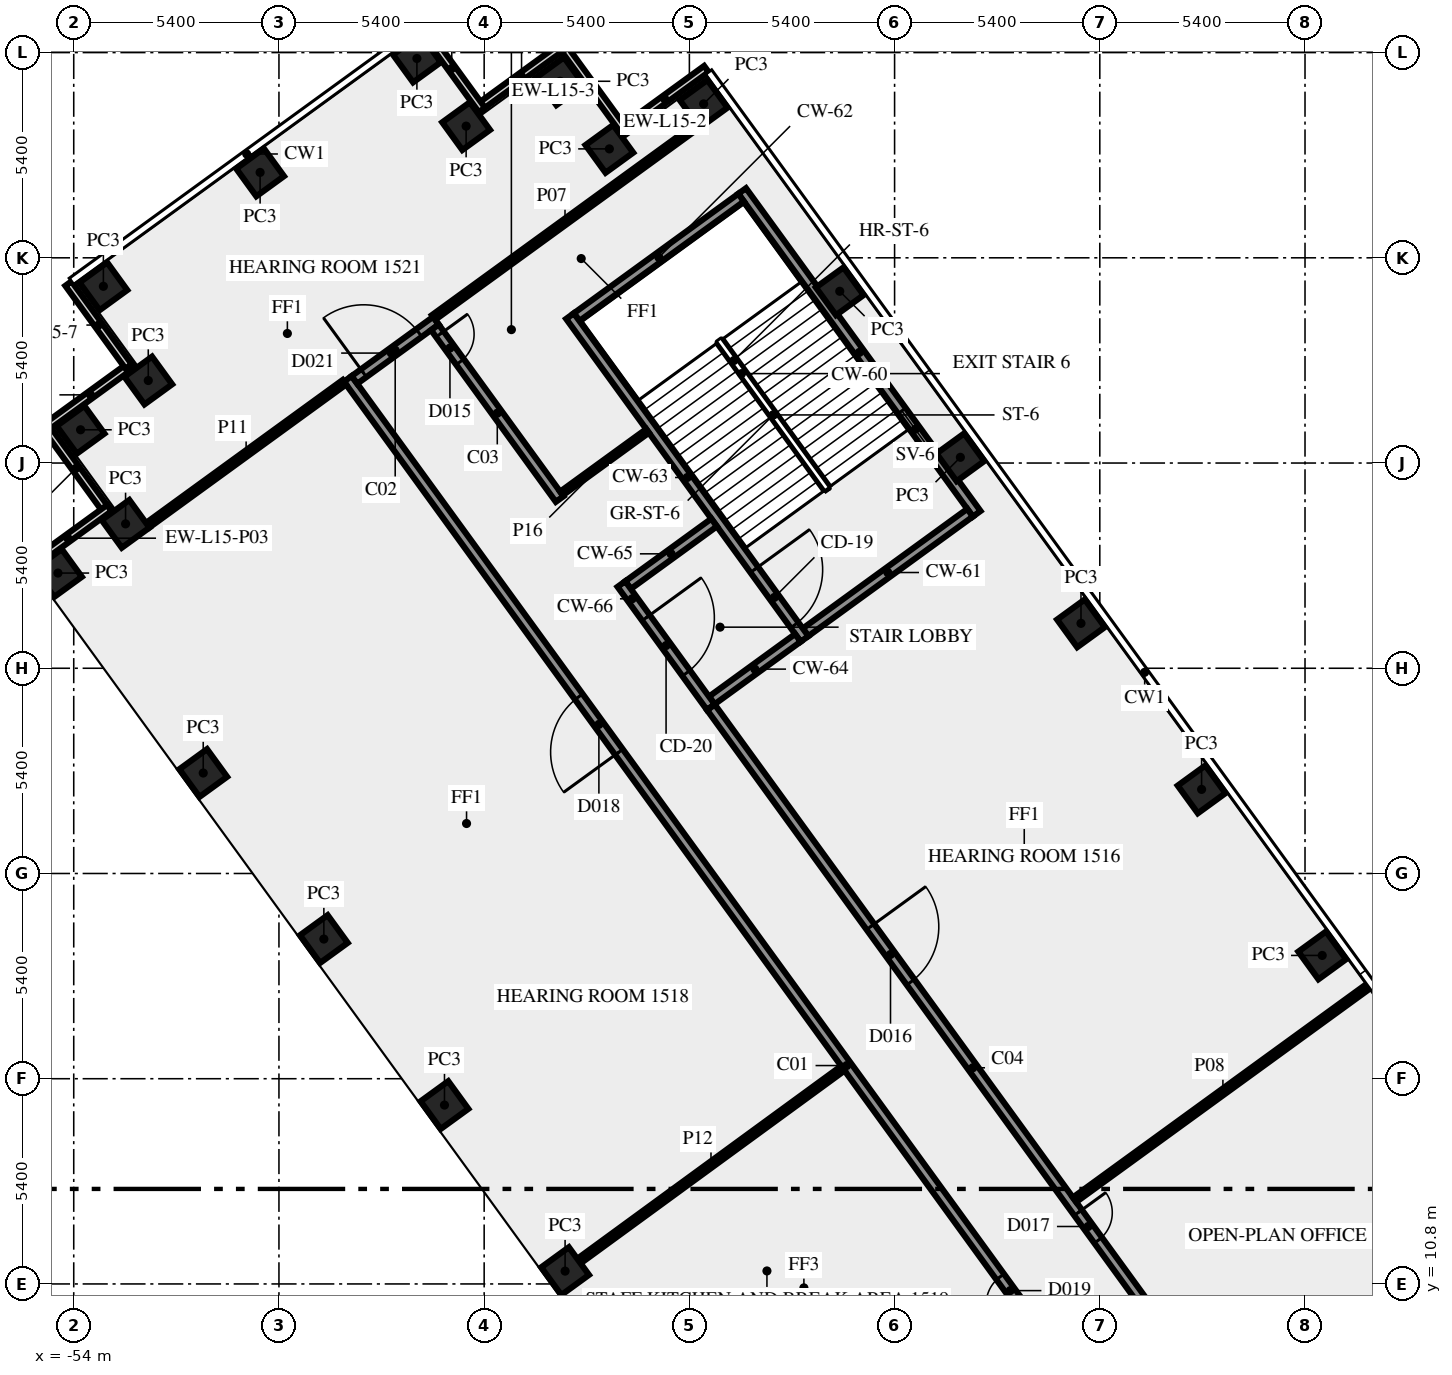
"""IFC4 building model, lengths in metres.
Left out: names, types, materials, properties, quantities, classifications, styles, units other than length and angle.
Written with IfcOpenShell. Run it as: python <this file> out.ifc"""

import sys

from ifc_helpers import new_model, si_unit, direction, frame, frame_2d, origin, origin_2d, place, context, subcontext, project, spatial, rectangle, extrude, element, fill, save


model = new_model("IFC4")
c1 = context("Model", 3, precision=1e-05, world=origin(), true_north=direction((0.0, 1.0)))
c2 = subcontext(c1, "Body", "Model", "MODEL_VIEW")
j1 = project(units=[si_unit("LENGTHUNIT", "METRE"), si_unit("PLANEANGLEUNIT", "RADIAN")], contexts=[c1])
p1 = place(None, origin())
s1 = spatial("IfcSite", under=j1, at=p1, CompositionType="ELEMENT")
p2 = place(p1, origin())
s2 = spatial("IfcBuilding", under=s1, at=p2, CompositionType="ELEMENT")
p3 = place(p2, frame((0.0, 0.0, 67.0)))
s3 = spatial("IfcBuildingStorey", under=s2, at=p3, CompositionType="ELEMENT", Elevation=67.0)
for number, where, z_axis, x_axis in (
    (1, (-21.147, 19.444, 0.0), (0.0, 0.0, 1.0), (-0.588, 0.809, 0.0)),
    (2, (-24.321, 23.812, 0.0), (0.0, 0.0, 1.0), (-0.588, 0.809, 0.0)),
    (3, (-27.495, 28.181, 0.0), (0.0, 0.0, 1.0), (-0.588, 0.809, 0.0)),
    (4, (-30.669, 32.55, 0.0), (0.0, 0.0, 1.0), (-0.588, 0.809, 0.0)),
    (5, (-33.843, 36.919, 0.0), (0.0, 0.0, 1.0), (-0.588, 0.809, 0.0)),
    (6, (-37.425, 41.85, 0.0), (0.0, 0.0, 1.0), (-0.588, 0.809, 0.0)),
    (7, (-39.906, 40.666, 0.0), (0.0, 0.0, 1.0), (-0.588, 0.809, 0.0)),
    (8, (-41.2, 42.445, 0.0), (0.0, 0.0, 1.0), (-0.588, 0.809, 0.0)),
    (9, (-43.675, 41.265, 0.0), (0.0, 0.0, 1.0), (-0.809, -0.588, 0.0)),
    (10, (-44.97, 43.045, 0.0), (0.0, 0.0, 1.0), (-0.809, -0.588, 0.0)),
    (11, (-49.096, 40.047, 0.0), (0.0, 0.0, 1.0), (-0.809, -0.588, 0.0)),
    (12, (-53.22, 37.05, 0.0), (0.0, 0.0, 1.0), (0.588, -0.809, 0.0)),
    (13, (-52.039, 34.571, 0.0), (0.0, 0.0, 1.0), (-0.809, -0.588, 0.0)),
    (14, (-53.82, 33.275, 0.0), (0.0, 0.0, 1.0), (0.588, -0.809, 0.0)),
    (15, (-52.636, 30.8, 0.0), (0.0, 0.0, 1.0), (-0.809, -0.588, 0.0)),
    (16, (-54.415, 29.505, 0.0), (0.0, 0.0, 1.0), (0.588, -0.809, 0.0)),
    (17, (-50.592, 24.243, 0.0), (0.0, 0.0, 1.0), (0.588, -0.809, 0.0)),
    (18, (-47.418, 19.875, 0.0), (0.0, 0.0, 1.0), (0.588, -0.809, 0.0)),
    (19, (-44.244, 15.506, 0.0), (0.0, 0.0, 1.0), (0.588, -0.809, 0.0)),
    (20, (-41.07, 11.137, 0.0), (0.0, 0.0, 1.0), (0.588, -0.809, 0.0)),
):
    element("IfcColumn", number, at=place(p3, frame(where, z_axis=z_axis, x_axis=x_axis)), inside=s3, PredefinedType="COLUMN", context=c2, shape_type="SweptSolid", body=[
        extrude(rectangle(XDim=0.9, YDim=0.9, at=origin_2d()), origin(), (0.0, 0.0, 1.0), 3.65),
    ])
p4 = place(p3, frame((-52.465, 34.987, 0.0), z_axis=(0.0, 0.0, 1.0), x_axis=(-0.809033161865, -0.587762999008, 0.0)))
e21 = element("IfcWall", 21, at=p4, inside=s3, PredefinedType="SOLIDWALL", context=c2, shape_type="SweptSolid", body=[
    extrude(rectangle(XDim=2.7, YDim=0.2, at=frame_2d((1.35, 0.0))), origin(), (0.0, 0.0, 1.0), 3.65),
])
p5 = place(p3, frame((-54.738, 33.351, 0.0), z_axis=(0.0, 0.0, 1.0), x_axis=(0.587779184282, -0.809021403008, 0.0)))
e22 = element("IfcWall", 22, at=p5, inside=s3, PredefinedType="SOLIDWALL", context=c2, shape_type="SweptSolid", body=[
    extrude(rectangle(XDim=2.7, YDim=0.2, at=frame_2d((1.35, 0.0))), origin(), (0.0, 0.0, 1.0), 3.65),
])
for number, where, z_axis, x_axis in (
    (23, (-53.063, 31.216, 0.0), (0.0, 0.0, 1.0), (-0.809, -0.588, 0.0)),
    (24, (-37.353, 42.768, 0.0), (0.0, 0.0, 1.0), (-0.809, -0.588, 0.0)),
):
    element("IfcWall", number, at=place(p3, frame(where, z_axis=z_axis, x_axis=x_axis)), inside=s3, PredefinedType="SOLIDWALL", context=c2, shape_type="SweptSolid", body=[
        extrude(rectangle(XDim=2.7, YDim=0.2, at=frame_2d((1.35, 0.0))), origin(), (0.0, 0.0, 1.0), 3.65),
    ])
p6 = place(p3, frame((-39.488, 41.094, 0.0), z_axis=(0.0, 0.0, 1.0), x_axis=(-0.587806000234, 0.809001919707, 0.0)))
e25 = element("IfcWall", 25, at=p6, inside=s3, PredefinedType="SOLIDWALL", context=c2, shape_type="SweptSolid", body=[
    extrude(rectangle(XDim=2.7, YDim=0.2, at=frame_2d((1.35, 0.0))), origin(), (0.0, 0.0, 1.0), 3.65),
])
for number, where, z_axis, x_axis in (
    (26, (-41.124, 43.366, 0.0), (0.0, 0.0, 1.0), (-0.809, -0.588, 0.0)),
    (27, (-43.259, 41.691, 0.0), (0.0, 0.0, 1.0), (-0.588, 0.809, 0.0)),
    (28, (-54.14, 37.123, 0.0), (0.0, 0.0, 1.0), (0.588, -0.809, 0.0)),
):
    element("IfcWall", number, at=place(p3, frame(where, z_axis=z_axis, x_axis=x_axis)), inside=s3, PredefinedType="SOLIDWALL", context=c2, shape_type="SweptSolid", body=[
        extrude(rectangle(XDim=2.7, YDim=0.2, at=frame_2d((1.35, 0.0))), origin(), (0.0, 0.0, 1.0), 3.65),
    ])
p7 = place(p3, frame((-30.24, 31.064, 0.0), z_axis=(0.0, 0.0, 1.0), x_axis=(-0.587795589702, 0.809009483706, 0.0)))
e29 = element("IfcWall", 29, at=p7, inside=s3, PredefinedType="SHEAR", context=c2, shape_type="SweptSolid", body=[
    extrude(rectangle(XDim=10.5, YDim=0.25, at=frame_2d((5.25, 0.0))), origin(), (0.0, 0.0, 1.0), 3.65),
])
p8 = place(p7, frame((2.15, 0.0, 1.0)))
e30 = element("IfcOpeningElement", 30, at=p8, cuts=e29, PredefinedType="OPENING", context=c2, shape_type="SweptSolid", body=[
    extrude(rectangle(XDim=1.2, YDim=1.2, at=frame_2d((0.6, 0.6))), frame((0.0, 0.135, 0.0), z_axis=(0.0, -1.0, 0.0), x_axis=(1.0, 0.0, 0.0)), (0.0, 0.0, 1.0), 0.27),
])
p9 = place(p3, frame((-30.414, 31.092, 0.0), z_axis=(0.0, 0.0, 1.0), x_axis=(-0.8089984606, -0.587810760999, 0.0)))
e31 = element("IfcWall", 31, at=p9, inside=s3, PredefinedType="SHEAR", context=c2, shape_type="SweptSolid", body=[
    extrude(rectangle(XDim=5.35, YDim=0.25, at=frame_2d((2.675, 0.0))), origin(), (0.0, 0.0, 1.0), 3.65),
])
p10 = place(p3, frame((-36.439, 39.384, 0.0), z_axis=(0.0, 0.0, 1.0), x_axis=(-0.809020161303, -0.587780893365, 0.0)))
e32 = element("IfcWall", 32, at=p10, inside=s3, PredefinedType="SHEAR", context=c2, shape_type="SweptSolid", body=[
    extrude(rectangle(XDim=5.35, YDim=0.25, at=frame_2d((2.675, 0.0))), origin(), (0.0, 0.0, 1.0), 3.65),
])
p11 = place(p3, frame((-40.942, 36.267, 0.0), z_axis=(0.0, 0.0, 1.0), x_axis=(0.587795589702, -0.809009483706, 0.0)))
e33 = element("IfcWall", 33, at=p11, inside=s3, PredefinedType="SHEAR", context=c2, shape_type="SweptSolid", body=[
    extrude(rectangle(XDim=10.5, YDim=0.25, at=frame_2d((5.25, 0.0))), origin(), (0.0, 0.0, 1.0), 3.65),
])
p12 = place(p11, frame((8.25, 0.0, 0.0)))
e34 = element("IfcOpeningElement", 34, at=p12, cuts=e33, PredefinedType="OPENING", context=c2, shape_type="SweptSolid", body=[
    extrude(rectangle(XDim=1.8, YDim=2.1, at=frame_2d((0.9, 1.05))), frame((0.0, 0.135, 0.0), z_axis=(0.0, -1.0, 0.0), x_axis=(1.0, 0.0, 0.0)), (0.0, 0.0, 1.0), 0.27),
])
for number, where, z_axis, x_axis in (
    (35, (-34.945, 27.8, 0.0), (0.0, 0.0, 1.0), (-0.809, -0.588, 0.0)),
    (36, (-37.149, 30.834, 0.0), (0.0, 0.0, 1.0), (-0.809, -0.588, 0.0)),
):
    element("IfcWall", number, at=place(p3, frame(where, z_axis=z_axis, x_axis=x_axis)), inside=s3, PredefinedType="SHEAR", context=c2, shape_type="SweptSolid", body=[
        extrude(rectangle(XDim=2.8, YDim=0.25, at=frame_2d((1.4, 0.0))), origin(), (0.0, 0.0, 1.0), 3.65),
    ])
p13 = place(p3, frame((-39.589, 29.216, 0.0), z_axis=(0.0, 0.0, 1.0), x_axis=(0.587772420479, -0.809026317077, 0.0)))
e37 = element("IfcWall", 37, at=p13, inside=s3, PredefinedType="SHEAR", context=c2, shape_type="SweptSolid", body=[
    extrude(rectangle(XDim=4.0, YDim=0.25, at=frame_2d((2.0, 0.0))), origin(), (0.0, 0.0, 1.0), 3.65),
])
p14 = place(p13, frame((1.1, 0.0, 0.0)))
e38 = element("IfcOpeningElement", 38, at=p14, cuts=e37, PredefinedType="OPENING", context=c2, shape_type="SweptSolid", body=[
    extrude(rectangle(XDim=1.8, YDim=2.1, at=frame_2d((0.9, 1.05))), frame((0.0, 0.135, 0.0), z_axis=(0.0, -1.0, 0.0), x_axis=(1.0, 0.0, 0.0)), (0.0, 0.0, 1.0), 0.27),
])
p15 = place(p3, frame((-20.531, -1.523, 0.0), z_axis=(0.0, 0.0, 1.0), x_axis=(-0.587784593204, 0.809017473231, 0.0)))
e39 = element("IfcWall", 39, at=p15, inside=s3, PredefinedType="SOLIDWALL", context=c2, shape_type="SweptSolid", body=[
    extrude(rectangle(XDim=44.67, YDim=0.25, at=frame_2d((22.335, 0.0))), origin(), (0.0, 0.0, 1.0), 3.65),
])
p16 = place(p15, frame((0.533, 0.0, 0.0)))
e40 = element("IfcOpeningElement", 40, at=p16, cuts=e39, PredefinedType="OPENING", context=c2, shape_type="SweptSolid", body=[
    extrude(rectangle(XDim=0.9, YDim=2.1, at=frame_2d((0.45, 1.05))), frame((0.0, 0.135, 0.0), z_axis=(0.0, -1.0, 0.0), x_axis=(1.0, 0.0, 0.0)), (0.0, 0.0, 1.0), 0.27),
])
p17 = place(p15, frame((32.531, 0.0, 0.0)))
e41 = element("IfcOpeningElement", 41, at=p17, cuts=e39, PredefinedType="OPENING", context=c2, shape_type="SweptSolid", body=[
    extrude(rectangle(XDim=1.8, YDim=2.1, at=frame_2d((0.9, 1.05))), frame((0.0, 0.135, 0.0), z_axis=(0.0, -1.0, 0.0), x_axis=(1.0, 0.0, 0.0)), (0.0, 0.0, 1.0), 0.27),
])
p18 = place(p15, frame((14.566, 0.0, 0.0)))
e42 = element("IfcOpeningElement", 42, at=p18, cuts=e39, PredefinedType="OPENING", context=c2, shape_type="SweptSolid", body=[
    extrude(rectangle(XDim=0.9, YDim=2.1, at=frame_2d((0.45, 1.05))), frame((0.0, 0.135, 0.0), z_axis=(0.0, -1.0, 0.0), x_axis=(1.0, 0.0, 0.0)), (0.0, 0.0, 1.0), 0.27),
])
p19 = place(p3, frame((-46.613, 34.588, 0.0), z_axis=(0.0, 0.0, 1.0), x_axis=(0.808994936898, 0.587815610607, 0.0)))
e43 = element("IfcWall", 43, at=p19, inside=s3, PredefinedType="SOLIDWALL", context=c2, shape_type="SweptSolid", body=[
    extrude(rectangle(XDim=2.65, YDim=0.25, at=frame_2d((1.325, 0.0))), origin(), (0.0, 0.0, 1.0), 3.65),
])
p20 = place(p19, frame((0.299, 0.0, 0.0)))
e44 = element("IfcOpeningElement", 44, at=p20, cuts=e43, PredefinedType="OPENING", context=c2, shape_type="SweptSolid", body=[
    extrude(rectangle(XDim=1.8, YDim=2.1, at=frame_2d((0.9, 1.05))), frame((0.0, 0.135, 0.0), z_axis=(0.0, -1.0, 0.0), x_axis=(1.0, 0.0, 0.0)), (0.0, 0.0, 1.0), 0.27),
])
p21 = place(p3, frame((-44.497, 35.971, 0.0), z_axis=(0.0, 0.0, 1.0), x_axis=(0.587742866856, -0.809047787501, 0.0)))
e45 = element("IfcWall", 45, at=p21, inside=s3, PredefinedType="SOLIDWALL", context=c2, shape_type="SweptSolid", body=[
    extrude(rectangle(XDim=5.586, YDim=0.25, at=frame_2d((2.793, 0.0))), origin(), (0.0, 0.0, 1.0), 3.65),
])
p22 = place(p21, frame((0.224, 0.0, 0.0)))
e46 = element("IfcOpeningElement", 46, at=p22, cuts=e45, PredefinedType="OPENING", context=c2, shape_type="SweptSolid", body=[
    extrude(rectangle(XDim=0.9, YDim=2.1, at=frame_2d((0.45, 1.05))), frame((0.0, 0.135, 0.0), z_axis=(0.0, -1.0, 0.0), x_axis=(1.0, 0.0, 0.0)), (0.0, 0.0, 1.0), 0.27),
])
p23 = place(p3, frame((-37.232, 25.972, 0.0), z_axis=(0.0, 0.0, 1.0), x_axis=(0.587786323093, -0.809016216391, 0.0)))
e47 = element("IfcWall", 47, at=p23, inside=s3, PredefinedType="SOLIDWALL", context=c2, shape_type="SweptSolid", body=[
    extrude(rectangle(XDim=33.493, YDim=0.25, at=frame_2d((16.747, 0.0))), origin(), (0.0, 0.0, 1.0), 3.65),
])
p24 = place(p23, frame((16.435, 0.0, 0.0)))
e48 = element("IfcOpeningElement", 48, at=p24, cuts=e47, PredefinedType="OPENING", context=c2, shape_type="SweptSolid", body=[
    extrude(rectangle(XDim=0.9, YDim=2.1, at=frame_2d((0.45, 1.05))), frame((0.0, 0.135, 0.0), z_axis=(0.0, -1.0, 0.0), x_axis=(1.0, 0.0, 0.0)), (0.0, 0.0, 1.0), 0.27),
])
p25 = place(p23, frame((7.137, 0.0, 0.0)))
e49 = element("IfcOpeningElement", 49, at=p25, cuts=e47, PredefinedType="OPENING", context=c2, shape_type="SweptSolid", body=[
    extrude(rectangle(XDim=1.8, YDim=2.1, at=frame_2d((0.9, 1.05))), frame((0.0, 0.135, 0.0), z_axis=(0.0, -1.0, 0.0), x_axis=(1.0, 0.0, 0.0)), (0.0, 0.0, 1.0), 0.27),
])
p26 = place(p3, frame((-37.614, 41.257, 0.0), z_axis=(0.0, 0.0, 1.0), x_axis=(-0.808991595707, -0.587820208972, 0.0)))
e50 = element("IfcWall", 50, at=p26, inside=s3, PredefinedType="PARTITIONING", context=c2, shape_type="SweptSolid", body=[
    extrude(rectangle(XDim=8.551, YDim=0.15, at=frame_2d((4.275, 0.0))), origin(), (0.0, 0.0, 1.0), 3.65),
])
p27 = place(p3, frame((-19.857, 18.689, 0.0), z_axis=(0.0, 0.0, 1.0), x_axis=(-0.809002920164, -0.587804623294, 0.0)))
e51 = element("IfcWall", 51, at=p27, inside=s3, PredefinedType="PARTITIONING", context=c2, shape_type="SweptSolid", body=[
    extrude(rectangle(XDim=9.651, YDim=0.15, at=frame_2d((4.825, 0.0))), origin(), (0.0, 0.0, 1.0), 2.75),
])
p28 = place(p3, frame((-46.877, 34.526, 0.0), z_axis=(0.0, 0.0, 1.0), x_axis=(-0.808993566199, -0.587817497059, 0.0)))
e52 = element("IfcWall", 52, at=p28, inside=s3, PredefinedType="PARTITIONING", context=c2, shape_type="SweptSolid", body=[
    extrude(rectangle(XDim=6.395, YDim=0.15, at=frame_2d((3.197, 0.0))), origin(), (0.0, 0.0, 1.0), 3.65),
])
p29 = place(p3, frame((-40.702, 11.405, 0.0), z_axis=(0.0, 0.0, 1.0), x_axis=(0.807600812808, 0.58972953729, 0.0)))
e53 = element("IfcWall", 53, at=p29, inside=s3, PredefinedType="PARTITIONING", context=c2, shape_type="SweptSolid", body=[
    extrude(rectangle(XDim=8.595, YDim=0.15, at=frame_2d((4.297, 0.0))), origin(), (0.0, 0.0, 1.0), 3.65),
])
p30 = place(p3, frame((-41.166, 31.599, 0.0), z_axis=(0.0, 0.0, 1.0), x_axis=(0.809090262332, 0.587684394381, 0.0)))
e54 = element("IfcWall", 54, at=p30, inside=s3, PredefinedType="PARTITIONING", context=c2, shape_type="SweptSolid", body=[
    extrude(rectangle(XDim=2.801, YDim=0.12, at=frame_2d((1.4, 0.0))), origin(), (0.0, 0.0, 1.0), 3.65),
])
p31 = place(p8, origin())
e55 = element("IfcWindow", 55, at=p31, inside=s3, PartitioningType="SINGLE_PANEL", PredefinedType="WINDOW", context=c2, shape_type="SweptSolid", body=[
    extrude(rectangle(XDim=1.2, YDim=1.2, at=frame_2d((0.6, 0.6))), frame((0.0, 0.03, 0.0), z_axis=(0.0, -1.0, 0.0), x_axis=(1.0, 0.0, 0.0)), (0.0, 0.0, 1.0), 0.06),
])
fill(e30, e55)
p32 = place(p12, origin())
e56 = element("IfcDoor", 56, at=p32, inside=s3, OperationType="DOUBLE_DOOR_SINGLE_SWING", PredefinedType="DOOR", context=c2, shape_type="SweptSolid", body=[
    extrude(rectangle(XDim=1.8, YDim=2.1, at=frame_2d((0.9, 1.05))), frame((0.0, 0.025, 0.0), z_axis=(0.0, -1.0, 0.0), x_axis=(1.0, 0.0, 0.0)), (0.0, 0.0, 1.0), 0.05),
])
fill(e34, e56)
p33 = place(p14, origin())
e57 = element("IfcDoor", 57, at=p33, inside=s3, OperationType="DOUBLE_DOOR_SINGLE_SWING", PredefinedType="DOOR", context=c2, shape_type="SweptSolid", body=[
    extrude(rectangle(XDim=1.8, YDim=2.1, at=frame_2d((0.9, 1.05))), frame((0.0, 0.025, 0.0), z_axis=(0.0, -1.0, 0.0), x_axis=(1.0, 0.0, 0.0)), (0.0, 0.0, 1.0), 0.05),
])
fill(e38, e57)
p34 = place(p22, origin())
e58 = element("IfcDoor", 58, at=p34, inside=s3, OperationType="SINGLE_SWING_LEFT", PredefinedType="DOOR", context=c2, shape_type="SweptSolid", body=[
    extrude(rectangle(XDim=0.9, YDim=2.1, at=frame_2d((0.45, 1.05))), frame((0.0, 0.025, 0.0), z_axis=(0.0, -1.0, 0.0), x_axis=(1.0, 0.0, 0.0)), (0.0, 0.0, 1.0), 0.05),
])
fill(e46, e58)
p35 = place(p24, origin())
e59 = element("IfcDoor", 59, at=p35, inside=s3, OperationType="SINGLE_SWING_LEFT", PredefinedType="DOOR", context=c2, shape_type="SweptSolid", body=[
    extrude(rectangle(XDim=0.9, YDim=2.1, at=frame_2d((0.45, 1.05))), frame((0.0, 0.025, 0.0), z_axis=(0.0, -1.0, 0.0), x_axis=(1.0, 0.0, 0.0)), (0.0, 0.0, 1.0), 0.05),
])
fill(e48, e59)
p36 = place(p25, origin())
e60 = element("IfcDoor", 60, at=p36, inside=s3, OperationType="DOUBLE_DOOR_SINGLE_SWING", PredefinedType="DOOR", context=c2, shape_type="SweptSolid", body=[
    extrude(rectangle(XDim=1.8, YDim=2.1, at=frame_2d((0.9, 1.05))), frame((0.0, 0.025, 0.0), z_axis=(0.0, -1.0, 0.0), x_axis=(1.0, 0.0, 0.0)), (0.0, 0.0, 1.0), 0.05),
])
fill(e49, e60)
p37 = place(p17, origin())
e61 = element("IfcDoor", 61, at=p37, inside=s3, OperationType="DOUBLE_DOOR_SINGLE_SWING", PredefinedType="DOOR", context=c2, shape_type="SweptSolid", body=[
    extrude(rectangle(XDim=1.8, YDim=2.1, at=frame_2d((0.9, 1.05))), frame((0.0, 0.025, 0.0), z_axis=(0.0, -1.0, 0.0), x_axis=(1.0, 0.0, 0.0)), (0.0, 0.0, 1.0), 0.05),
])
fill(e41, e61)
p38 = place(p20, origin())
e62 = element("IfcDoor", 62, at=p38, inside=s3, OperationType="DOUBLE_DOOR_SINGLE_SWING", PredefinedType="DOOR", context=c2, shape_type="SweptSolid", body=[
    extrude(rectangle(XDim=1.8, YDim=2.1, at=frame_2d((0.9, 1.05))), frame((0.0, 0.025, 0.0), z_axis=(0.0, -1.0, 0.0), x_axis=(1.0, 0.0, 0.0)), (0.0, 0.0, 1.0), 0.05),
])
fill(e44, e62)
p39 = place(p18, origin())
e63 = element("IfcDoor", 63, at=p39, inside=s3, OperationType="SINGLE_SWING_LEFT", PredefinedType="DOOR", context=c2, shape_type="SweptSolid", body=[
    extrude(rectangle(XDim=0.9, YDim=2.1, at=frame_2d((0.45, 1.05))), frame((0.0, 0.025, 0.0), z_axis=(0.0, -1.0, 0.0), x_axis=(1.0, 0.0, 0.0)), (0.0, 0.0, 1.0), 0.05),
])
fill(e42, e63)
save(model, sys.argv[1])
